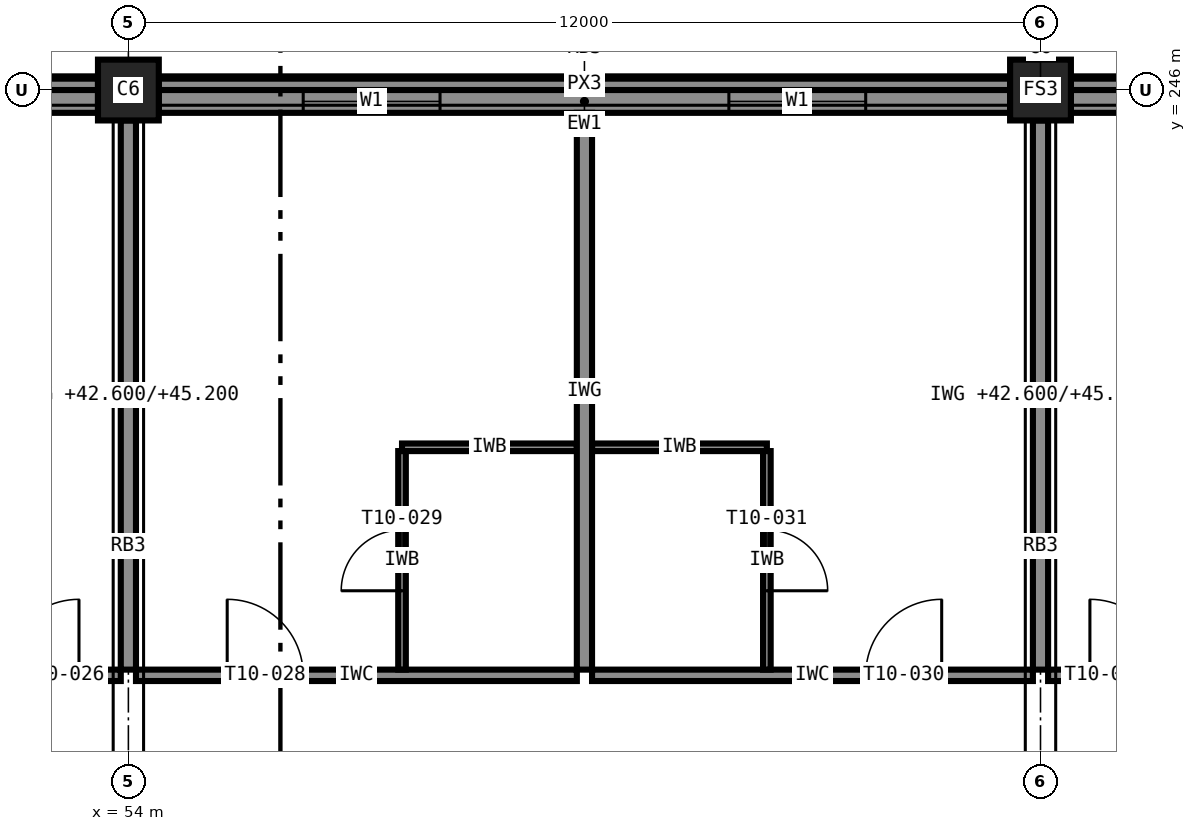
"""IFC4 building model, lengths in metres.
Left out: names, types, materials, properties, quantities, classifications, styles, units other than length and angle.
Written with IfcOpenShell. Run it as: python <this file> out.ifc"""

import sys

from ifc_helpers import new_model, si_unit, direction, frame, frame_2d, origin, origin_2d, place, context, subcontext, project, spatial, rectangle, extrude, element, fill, save


model = new_model("IFC4")
c1 = context("Model", 3, precision=1e-05, world=origin(), true_north=direction((0.0, 1.0)))
c2 = subcontext(c1, "Body", "Model", "MODEL_VIEW")
j1 = project(units=[si_unit("LENGTHUNIT", "METRE"), si_unit("PLANEANGLEUNIT", "RADIAN")], contexts=[c1])
p1 = place(None, origin())
s1 = spatial("IfcSite", under=j1, at=p1, CompositionType="ELEMENT")
p2 = place(p1, origin())
s2 = spatial("IfcBuilding", under=s1, at=p2, CompositionType="ELEMENT")
p3 = place(p2, frame((0.0, 0.0, 42.6)))
s3 = spatial("IfcBuildingStorey", under=s2, at=p3, CompositionType="ELEMENT", Elevation=42.6)
for number, where, z_axis, x_axis in (
    (1, (54.0, 246.0, 0.0), (0.0, 0.0, 1.0), (1.0, 0.0, 0.0)),
    (2, (66.0, 246.0, 0.0), (0.0, 0.0, 1.0), (1.0, 0.0, 0.0)),
):
    element("IfcColumn", number, at=place(p3, frame(where, z_axis=z_axis, x_axis=x_axis)), inside=s3, PredefinedType="COLUMN", context=c2, shape_type="SweptSolid", body=[
        extrude(rectangle(XDim=0.8, YDim=0.8, at=origin_2d()), origin(), (0.0, 0.0, 1.0), 3.6),
    ])
p4 = place(p3, frame((77.6, 245.85, 0.0), z_axis=(0.0, 0.0, 1.0), x_axis=(-1.0, 0.0, 0.0)))
e3 = element("IfcWall", 3, at=p4, inside=s3, PredefinedType="STANDARD", context=c2, shape_type="SweptSolid", body=[
    extrude(rectangle(XDim=11.2, YDim=0.3, at=frame_2d((5.6, 0.0))), origin(), (0.0, 0.0, 1.0), 2.6),
])
p5 = place(p4, frame((8.5, 0.0, 0.85)))
e4 = element("IfcOpeningElement", 4, at=p5, cuts=e3, PredefinedType="OPENING", context=c2, shape_type="SweptSolid", body=[
    extrude(rectangle(XDim=1.8, YDim=1.75, at=frame_2d((0.9, 0.875))), frame((0.0, 0.16, 0.0), z_axis=(0.0, -1.0, 0.0), x_axis=(1.0, 0.0, 0.0)), (0.0, 0.0, 1.0), 0.32),
])
p6 = place(p4, frame((4.7, 0.0, 0.85)))
e5 = element("IfcOpeningElement", 5, at=p6, cuts=e3, PredefinedType="OPENING", context=c2, shape_type="SweptSolid", body=[
    extrude(rectangle(XDim=1.8, YDim=1.75, at=frame_2d((0.9, 0.875))), frame((0.0, 0.16, 0.0), z_axis=(0.0, -1.0, 0.0), x_axis=(1.0, 0.0, 0.0)), (0.0, 0.0, 1.0), 0.32),
])
p7 = place(p4, frame((0.9, 0.0, 0.85)))
e6 = element("IfcOpeningElement", 6, at=p7, cuts=e3, PredefinedType="OPENING", context=c2, shape_type="SweptSolid", body=[
    extrude(rectangle(XDim=1.8, YDim=1.75, at=frame_2d((0.9, 0.875))), frame((0.0, 0.16, 0.0), z_axis=(0.0, -1.0, 0.0), x_axis=(1.0, 0.0, 0.0)), (0.0, 0.0, 1.0), 0.32),
])
p8 = place(p3, frame((65.6, 245.85, 0.0), z_axis=(0.0, 0.0, 1.0), x_axis=(-1.0, 0.0, 0.0)))
e7 = element("IfcWall", 7, at=p8, inside=s3, PredefinedType="STANDARD", context=c2, shape_type="SweptSolid", body=[
    extrude(rectangle(XDim=11.2, YDim=0.3, at=frame_2d((5.6, 0.0))), origin(), (0.0, 0.0, 1.0), 2.6),
])
p9 = place(p8, frame((7.5, 0.0, 0.85)))
e8 = element("IfcOpeningElement", 8, at=p9, cuts=e7, PredefinedType="OPENING", context=c2, shape_type="SweptSolid", body=[
    extrude(rectangle(XDim=1.8, YDim=1.75, at=frame_2d((0.9, 0.875))), frame((0.0, 0.16, 0.0), z_axis=(0.0, -1.0, 0.0), x_axis=(1.0, 0.0, 0.0)), (0.0, 0.0, 1.0), 0.32),
])
p10 = place(p8, frame((1.9, 0.0, 0.85)))
e9 = element("IfcOpeningElement", 9, at=p10, cuts=e7, PredefinedType="OPENING", context=c2, shape_type="SweptSolid", body=[
    extrude(rectangle(XDim=1.8, YDim=1.75, at=frame_2d((0.9, 0.875))), frame((0.0, 0.16, 0.0), z_axis=(0.0, -1.0, 0.0), x_axis=(1.0, 0.0, 0.0)), (0.0, 0.0, 1.0), 0.32),
])
p11 = place(p3, frame((53.6, 245.85, 0.0), z_axis=(0.0, 0.0, 1.0), x_axis=(-1.0, 0.0, 0.0)))
e10 = element("IfcWall", 10, at=p11, inside=s3, PredefinedType="STANDARD", context=c2, shape_type="SweptSolid", body=[
    extrude(rectangle(XDim=11.2, YDim=0.3, at=frame_2d((5.6, 0.0))), origin(), (0.0, 0.0, 1.0), 2.6),
])
p12 = place(p11, frame((4.7, 0.0, 0.85)))
e11 = element("IfcOpeningElement", 11, at=p12, cuts=e10, PredefinedType="OPENING", context=c2, shape_type="SweptSolid", body=[
    extrude(rectangle(XDim=1.8, YDim=1.75, at=frame_2d((0.9, 0.875))), frame((0.0, 0.16, 0.0), z_axis=(0.0, -1.0, 0.0), x_axis=(1.0, 0.0, 0.0)), (0.0, 0.0, 1.0), 0.32),
])
p13 = place(p11, frame((0.9, 0.0, 0.85)))
e12 = element("IfcOpeningElement", 12, at=p13, cuts=e10, PredefinedType="OPENING", context=c2, shape_type="SweptSolid", body=[
    extrude(rectangle(XDim=1.8, YDim=1.75, at=frame_2d((0.9, 0.875))), frame((0.0, 0.16, 0.0), z_axis=(0.0, -1.0, 0.0), x_axis=(1.0, 0.0, 0.0)), (0.0, 0.0, 1.0), 0.32),
])
for number, where, z_axis, x_axis in (
    (13, (77.6, 246.075, 3.4), (0.0, 0.0, 1.0), (-1.0, 0.0, 0.0)),
    (14, (65.6, 246.075, 3.4), (0.0, 0.0, 1.0), (-1.0, 0.0, 0.0)),
    (15, (53.6, 246.075, 3.4), (0.0, 0.0, 1.0), (-1.0, 0.0, 0.0)),
):
    element("IfcWall", number, at=place(p3, frame(where, z_axis=z_axis, x_axis=x_axis)), inside=s3, PredefinedType="STANDARD", context=c2, shape_type="SweptSolid", body=[
        extrude(rectangle(XDim=11.2, YDim=0.15, at=frame_2d((5.6, 0.0))), origin(), (0.0, 0.0, 1.0), 0.2),
    ])
p14 = place(p3, frame((50.1, 238.3, 0.0), z_axis=(0.0, 0.0, 1.0), x_axis=(1.0, 0.0, 0.0)))
e16 = element("IfcWall", 16, at=p14, inside=s3, PredefinedType="PARTITIONING", context=c2, shape_type="SweptSolid", body=[
    extrude(rectangle(XDim=3.8, YDim=0.15, at=frame_2d((1.9, 0.0))), origin(), (0.0, 0.0, 1.0), 3.4),
])
p15 = place(p14, frame((2.25, 0.0, 0.0)))
e17 = element("IfcOpeningElement", 17, at=p15, cuts=e16, PredefinedType="OPENING", context=c2, shape_type="SweptSolid", body=[
    extrude(rectangle(XDim=1.0, YDim=2.1, at=frame_2d((0.5, 1.05))), frame((0.0, 0.085, 0.0), z_axis=(0.0, -1.0, 0.0), x_axis=(1.0, 0.0, 0.0)), (0.0, 0.0, 1.0), 0.17),
])
p16 = place(p3, frame((54.1, 238.3, 0.0), z_axis=(0.0, 0.0, 1.0), x_axis=(1.0, 0.0, 0.0)))
e18 = element("IfcWall", 18, at=p16, inside=s3, PredefinedType="PARTITIONING", context=c2, shape_type="SweptSolid", body=[
    extrude(rectangle(XDim=5.8, YDim=0.15, at=frame_2d((2.9, 0.0))), origin(), (0.0, 0.0, 1.0), 3.4),
])
p17 = place(p16, frame((1.2, 0.0, 0.0)))
e19 = element("IfcOpeningElement", 19, at=p17, cuts=e18, PredefinedType="OPENING", context=c2, shape_type="SweptSolid", body=[
    extrude(rectangle(XDim=1.0, YDim=2.1, at=frame_2d((0.5, 1.05))), frame((0.0, 0.085, 0.0), z_axis=(0.0, -1.0, 0.0), x_axis=(1.0, 0.0, 0.0)), (0.0, 0.0, 1.0), 0.17),
])
p18 = place(p3, frame((57.6, 241.3, 0.0), z_axis=(0.0, 0.0, 1.0), x_axis=(1.0, 0.0, 0.0)))
e20 = element("IfcWall", 20, at=p18, inside=s3, PredefinedType="PARTITIONING", context=c2, shape_type="SweptSolid", body=[
    extrude(rectangle(XDim=2.3, YDim=0.1, at=frame_2d((1.15, 0.0))), origin(), (0.0, 0.0, 1.0), 3.4),
])
p19 = place(p3, frame((57.6, 238.375, 0.0), z_axis=(0.0, 0.0, 1.0), x_axis=(0.0, 1.0, 0.0)))
e21 = element("IfcWall", 21, at=p19, inside=s3, PredefinedType="PARTITIONING", context=c2, shape_type="SweptSolid", body=[
    extrude(rectangle(XDim=2.875, YDim=0.1, at=frame_2d((1.438, 0.0))), origin(), (0.0, 0.0, 1.0), 3.4),
])
p20 = place(p19, frame((1.038, 0.0, 0.0)))
e22 = element("IfcOpeningElement", 22, at=p20, cuts=e21, PredefinedType="OPENING", context=c2, shape_type="SweptSolid", body=[
    extrude(rectangle(XDim=0.8, YDim=2.1, at=frame_2d((0.4, 1.05))), frame((0.0, 0.06, 0.0), z_axis=(0.0, -1.0, 0.0), x_axis=(1.0, 0.0, 0.0)), (0.0, 0.0, 1.0), 0.12),
])
p21 = place(p3, frame((60.1, 238.3, 0.0), z_axis=(0.0, 0.0, 1.0), x_axis=(1.0, 0.0, 0.0)))
e23 = element("IfcWall", 23, at=p21, inside=s3, PredefinedType="PARTITIONING", context=c2, shape_type="SweptSolid", body=[
    extrude(rectangle(XDim=5.8, YDim=0.15, at=frame_2d((2.9, 0.0))), origin(), (0.0, 0.0, 1.0), 3.4),
])
p22 = place(p21, frame((3.6, 0.0, 0.0)))
e24 = element("IfcOpeningElement", 24, at=p22, cuts=e23, PredefinedType="OPENING", context=c2, shape_type="SweptSolid", body=[
    extrude(rectangle(XDim=1.0, YDim=2.1, at=frame_2d((0.5, 1.05))), frame((0.0, 0.085, 0.0), z_axis=(0.0, -1.0, 0.0), x_axis=(1.0, 0.0, 0.0)), (0.0, 0.0, 1.0), 0.17),
])
p23 = place(p3, frame((60.1, 241.3, 0.0), z_axis=(0.0, 0.0, 1.0), x_axis=(1.0, 0.0, 0.0)))
e25 = element("IfcWall", 25, at=p23, inside=s3, PredefinedType="PARTITIONING", context=c2, shape_type="SweptSolid", body=[
    extrude(rectangle(XDim=2.3, YDim=0.1, at=frame_2d((1.15, 0.0))), origin(), (0.0, 0.0, 1.0), 3.4),
])
p24 = place(p3, frame((62.4, 241.25, 0.0), z_axis=(0.0, 0.0, 1.0), x_axis=(0.0, -1.0, 0.0)))
e26 = element("IfcWall", 26, at=p24, inside=s3, PredefinedType="PARTITIONING", context=c2, shape_type="SweptSolid", body=[
    extrude(rectangle(XDim=2.875, YDim=0.1, at=frame_2d((1.438, 0.0))), origin(), (0.0, 0.0, 1.0), 3.4),
])
p25 = place(p24, frame((1.038, 0.0, 0.0)))
e27 = element("IfcOpeningElement", 27, at=p25, cuts=e26, PredefinedType="OPENING", context=c2, shape_type="SweptSolid", body=[
    extrude(rectangle(XDim=0.8, YDim=2.1, at=frame_2d((0.4, 1.05))), frame((0.0, 0.06, 0.0), z_axis=(0.0, -1.0, 0.0), x_axis=(1.0, 0.0, 0.0)), (0.0, 0.0, 1.0), 0.12),
])
p26 = place(p3, frame((66.1, 238.3, 0.0), z_axis=(0.0, 0.0, 1.0), x_axis=(1.0, 0.0, 0.0)))
e28 = element("IfcWall", 28, at=p26, inside=s3, PredefinedType="PARTITIONING", context=c2, shape_type="SweptSolid", body=[
    extrude(rectangle(XDim=3.8, YDim=0.15, at=frame_2d((1.9, 0.0))), origin(), (0.0, 0.0, 1.0), 3.4),
])
p27 = place(p26, frame((0.55, 0.0, 0.0)))
e29 = element("IfcOpeningElement", 29, at=p27, cuts=e28, PredefinedType="OPENING", context=c2, shape_type="SweptSolid", body=[
    extrude(rectangle(XDim=1.0, YDim=2.1, at=frame_2d((0.5, 1.05))), frame((0.0, 0.085, 0.0), z_axis=(0.0, -1.0, 0.0), x_axis=(1.0, 0.0, 0.0)), (0.0, 0.0, 1.0), 0.17),
])
p28 = place(p3, frame((54.0, 245.6, 0.0), z_axis=(0.0, 0.0, 1.0), x_axis=(0.0, -1.0, 0.0)))
e30 = element("IfcWall", 30, at=p28, inside=s3, PredefinedType="PARTITIONING", context=c2, shape_type="SweptSolid", body=[
    extrude(rectangle(XDim=7.225, YDim=0.2, at=frame_2d((3.613, 0.0))), origin(), (0.0, 0.0, 1.0), 2.6),
])
p29 = place(p3, frame((60.0, 245.7, 0.0), z_axis=(0.0, 0.0, 1.0), x_axis=(0.0, -1.0, 0.0)))
e31 = element("IfcWall", 31, at=p29, inside=s3, PredefinedType="PARTITIONING", context=c2, shape_type="SweptSolid", body=[
    extrude(rectangle(XDim=7.325, YDim=0.2, at=frame_2d((3.663, 0.0))), origin(), (0.0, 0.0, 1.0), 3.4),
])
p30 = place(p3, frame((66.0, 245.6, 0.0), z_axis=(0.0, 0.0, 1.0), x_axis=(0.0, -1.0, 0.0)))
e32 = element("IfcWall", 32, at=p30, inside=s3, PredefinedType="PARTITIONING", context=c2, shape_type="SweptSolid", body=[
    extrude(rectangle(XDim=7.225, YDim=0.2, at=frame_2d((3.613, 0.0))), origin(), (0.0, 0.0, 1.0), 2.6),
])
p31 = place(p9, origin())
e33 = element("IfcWindow", 33, at=p31, inside=s3, PartitioningType="SINGLE_PANEL", PredefinedType="WINDOW", context=c2, shape_type="SweptSolid", body=[
    extrude(rectangle(XDim=1.8, YDim=1.75, at=frame_2d((0.9, 0.875))), frame((0.0, 0.03, 0.0), z_axis=(0.0, -1.0, 0.0), x_axis=(1.0, 0.0, 0.0)), (0.0, 0.0, 1.0), 0.06),
])
fill(e8, e33)
p32 = place(p10, origin())
e34 = element("IfcWindow", 34, at=p32, inside=s3, PartitioningType="SINGLE_PANEL", PredefinedType="WINDOW", context=c2, shape_type="SweptSolid", body=[
    extrude(rectangle(XDim=1.8, YDim=1.75, at=frame_2d((0.9, 0.875))), frame((0.0, 0.03, 0.0), z_axis=(0.0, -1.0, 0.0), x_axis=(1.0, 0.0, 0.0)), (0.0, 0.0, 1.0), 0.06),
])
fill(e9, e34)
p33 = place(p15, origin())
e35 = element("IfcDoor", 35, at=p33, inside=s3, OperationType="SINGLE_SWING_RIGHT", PredefinedType="DOOR", context=c2, shape_type="SweptSolid", body=[
    extrude(rectangle(XDim=1.0, YDim=2.1, at=frame_2d((0.5, 1.05))), frame((0.0, 0.025, 0.0), z_axis=(0.0, -1.0, 0.0), x_axis=(1.0, 0.0, 0.0)), (0.0, 0.0, 1.0), 0.05),
])
fill(e17, e35)
p34 = place(p17, origin())
e36 = element("IfcDoor", 36, at=p34, inside=s3, OperationType="SINGLE_SWING_LEFT", PredefinedType="DOOR", context=c2, shape_type="SweptSolid", body=[
    extrude(rectangle(XDim=1.0, YDim=2.1, at=frame_2d((0.5, 1.05))), frame((0.0, 0.025, 0.0), z_axis=(0.0, -1.0, 0.0), x_axis=(1.0, 0.0, 0.0)), (0.0, 0.0, 1.0), 0.05),
])
fill(e19, e36)
p35 = place(p20, origin())
e37 = element("IfcDoor", 37, at=p35, inside=s3, OperationType="SINGLE_SWING_LEFT", PredefinedType="DOOR", context=c2, shape_type="SweptSolid", body=[
    extrude(rectangle(XDim=0.8, YDim=2.1, at=frame_2d((0.4, 1.05))), frame((0.0, 0.025, 0.0), z_axis=(0.0, -1.0, 0.0), x_axis=(1.0, 0.0, 0.0)), (0.0, 0.0, 1.0), 0.05),
])
fill(e22, e37)
p36 = place(p22, origin())
e38 = element("IfcDoor", 38, at=p36, inside=s3, OperationType="SINGLE_SWING_RIGHT", PredefinedType="DOOR", context=c2, shape_type="SweptSolid", body=[
    extrude(rectangle(XDim=1.0, YDim=2.1, at=frame_2d((0.5, 1.05))), frame((0.0, 0.025, 0.0), z_axis=(0.0, -1.0, 0.0), x_axis=(1.0, 0.0, 0.0)), (0.0, 0.0, 1.0), 0.05),
])
fill(e24, e38)
p37 = place(p25, origin())
e39 = element("IfcDoor", 39, at=p37, inside=s3, OperationType="SINGLE_SWING_RIGHT", PredefinedType="DOOR", context=c2, shape_type="SweptSolid", body=[
    extrude(rectangle(XDim=0.8, YDim=2.1, at=frame_2d((0.4, 1.05))), frame((0.0, 0.025, 0.0), z_axis=(0.0, -1.0, 0.0), x_axis=(1.0, 0.0, 0.0)), (0.0, 0.0, 1.0), 0.05),
])
fill(e27, e39)
p38 = place(p27, origin())
e40 = element("IfcDoor", 40, at=p38, inside=s3, OperationType="SINGLE_SWING_LEFT", PredefinedType="DOOR", context=c2, shape_type="SweptSolid", body=[
    extrude(rectangle(XDim=1.0, YDim=2.1, at=frame_2d((0.5, 1.05))), frame((0.0, 0.025, 0.0), z_axis=(0.0, -1.0, 0.0), x_axis=(1.0, 0.0, 0.0)), (0.0, 0.0, 1.0), 0.05),
])
fill(e29, e40)
save(model, sys.argv[1])
